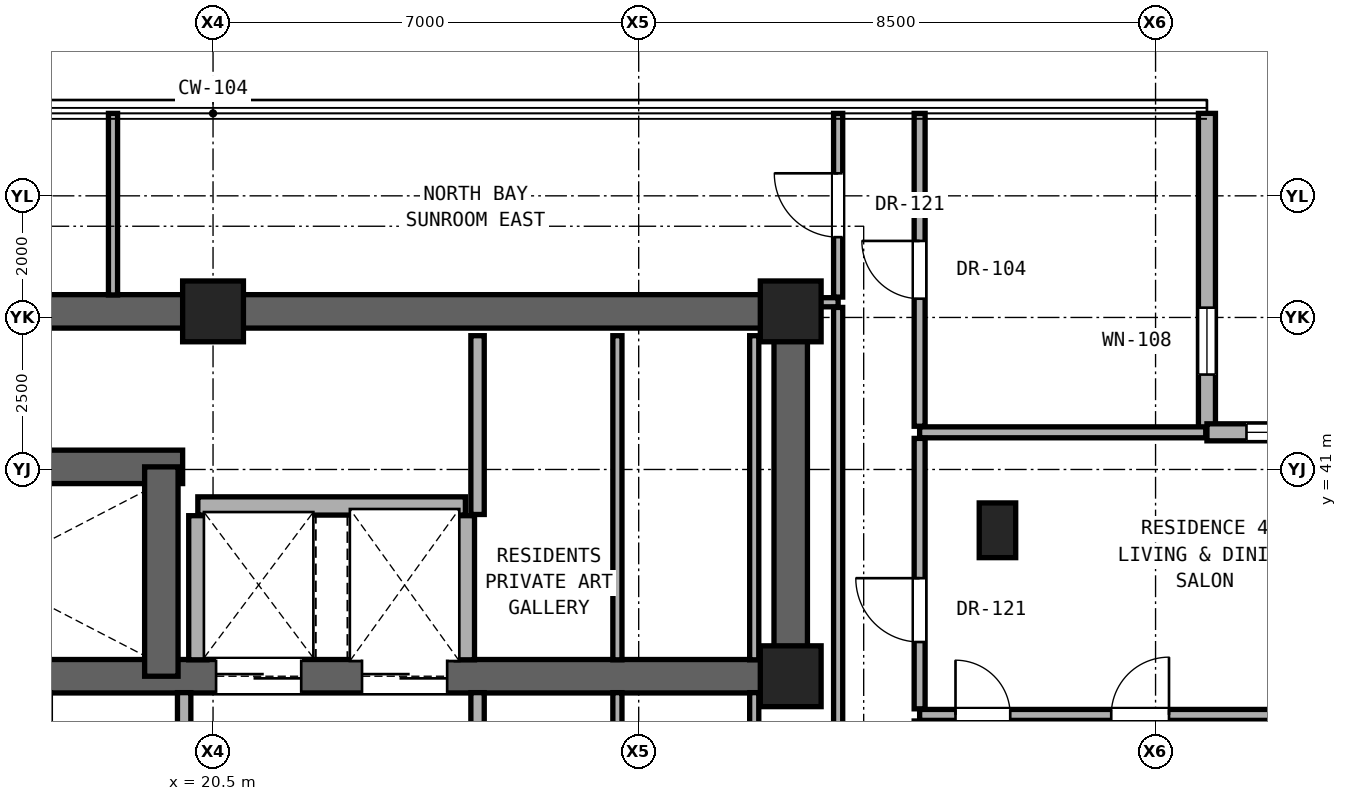
"""IFC4 building model, lengths in metres.
Left out: names, types, materials, properties, quantities, classifications, styles, units other than length and angle.
Written with IfcOpenShell. Run it as: python <this file> out.ifc"""

import sys

from ifc_helpers import new_model, si_unit, direction, frame, frame_2d, origin, origin_2d, place, context, subcontext, project, spatial, rectangle, extrude, element, fill, save


model = new_model("IFC4")
c1 = context("Model", 3, precision=1e-05, world=origin(), true_north=direction((0.0, 1.0)))
c2 = subcontext(c1, "Body", "Model", "MODEL_VIEW")
j1 = project(units=[si_unit("LENGTHUNIT", "METRE"), si_unit("PLANEANGLEUNIT", "RADIAN")], contexts=[c1])
p1 = place(None, origin())
s1 = spatial("IfcSite", under=j1, at=p1, CompositionType="ELEMENT")
p2 = place(p1, origin())
s2 = spatial("IfcBuilding", under=s1, at=p2, CompositionType="ELEMENT")
p3 = place(p2, frame((0.0, 0.0, 177.15)))
s3 = spatial("IfcBuildingStorey", under=s2, at=p3, CompositionType="ELEMENT", Elevation=177.15)
for number, where, z_axis, x_axis in (
    (1, (30.0, 37.6, 0.0), (0.0, 0.0, 1.0), (1.0, 0.0, 0.0)),
    (2, (20.5, 43.6, 0.0), (0.0, 0.0, 1.0), (1.0, 0.0, 0.0)),
    (3, (30.0, 43.6, 0.0), (0.0, 0.0, 1.0), (1.0, 0.0, 0.0)),
):
    element("IfcColumn", number, at=place(p3, frame(where, z_axis=z_axis, x_axis=x_axis)), inside=s3, PredefinedType="COLUMN", context=c2, shape_type="SweptSolid", body=[
        extrude(rectangle(XDim=1.0, YDim=1.0, at=origin_2d()), origin(), (0.0, 0.0, 1.0), 3.25),
    ])
p4 = place(p3, frame((33.4, 40.0, 0.0), z_axis=(0.0, 0.0, 1.0), x_axis=(1.0, 0.0, 0.0)))
e4 = element("IfcColumn", 4, at=p4, inside=s3, PredefinedType="PILASTER", context=c2, shape_type="SweptSolid", body=[
    extrude(rectangle(XDim=0.6, YDim=0.9, at=origin_2d()), origin(), (0.0, 0.0, 1.0), 3.25),
])
p5 = place(p3, frame((11.0, 43.6, 0.0), z_axis=(0.0, 0.0, 1.0), x_axis=(1.0, 0.0, 0.0)))
e5 = element("IfcWall", 5, at=p5, inside=s3, PredefinedType="SHEAR", context=c2, shape_type="SweptSolid", body=[
    extrude(rectangle(XDim=19.0, YDim=0.55, at=frame_2d((9.5, 0.0))), origin(), (0.0, 0.0, 1.0), 3.05),
])
p6 = place(p3, frame((30.0, 37.6, 0.0), z_axis=(0.0, 0.0, 1.0), x_axis=(0.0, 1.0, 0.0)))
e6 = element("IfcWall", 6, at=p6, inside=s3, PredefinedType="SHEAR", context=c2, shape_type="SweptSolid", body=[
    extrude(rectangle(XDim=6.0, YDim=0.55, at=frame_2d((3.0, 0.0))), origin(), (0.0, 0.0, 1.0), 3.05),
])
p7 = place(p3, frame((11.0, 37.6, 0.0), z_axis=(0.0, 0.0, 1.0), x_axis=(1.0, 0.0, 0.0)))
e7 = element("IfcWall", 7, at=p7, inside=s3, PredefinedType="SHEAR", context=c2, shape_type="SweptSolid", body=[
    extrude(rectangle(XDim=19.0, YDim=0.55, at=frame_2d((9.5, 0.0))), origin(), (0.0, 0.0, 1.0), 3.05),
])
p8 = place(p7, frame((1.06, 0.0, 0.0)))
e8 = element("IfcOpeningElement", 8, at=p8, cuts=e7, PredefinedType="OPENING", context=c2, shape_type="SweptSolid", body=[
    extrude(rectangle(XDim=1.15, YDim=2.2, at=frame_2d((0.575, 1.1))), frame((0.0, 0.285, 0.0), z_axis=(0.0, -1.0, 0.0), x_axis=(1.0, 0.0, 0.0)), (0.0, 0.0, 1.0), 0.57),
])
p9 = place(p7, frame((9.55, 0.0, 0.0)))
e9 = element("IfcOpeningElement", 9, at=p9, cuts=e7, PredefinedType="OPENING", context=c2, shape_type="SweptSolid", body=[
    extrude(rectangle(XDim=1.4, YDim=2.35, at=frame_2d((0.7, 1.175))), frame((0.0, 0.285, 0.0), z_axis=(0.0, -1.0, 0.0), x_axis=(1.0, 0.0, 0.0)), (0.0, 0.0, 1.0), 0.57),
])
p10 = place(p7, frame((11.95, 0.0, 0.0)))
e10 = element("IfcOpeningElement", 10, at=p10, cuts=e7, PredefinedType="OPENING", context=c2, shape_type="SweptSolid", body=[
    extrude(rectangle(XDim=1.4, YDim=2.35, at=frame_2d((0.7, 1.175))), frame((0.0, 0.285, 0.0), z_axis=(0.0, -1.0, 0.0), x_axis=(1.0, 0.0, 0.0)), (0.0, 0.0, 1.0), 0.57),
])
p11 = place(p3, frame((11.0, 41.043, 0.0), z_axis=(0.0, 0.0, 1.0), x_axis=(1.0, 0.0, 0.0)))
e11 = element("IfcWall", 11, at=p11, inside=s3, PredefinedType="SHEAR", context=c2, shape_type="SweptSolid", body=[
    extrude(rectangle(XDim=9.0, YDim=0.55, at=frame_2d((4.5, 0.0))), origin(), (0.0, 0.0, 1.0), 3.05),
])
p12 = place(p3, frame((19.65, 37.6, 0.0), z_axis=(0.0, 0.0, 1.0), x_axis=(0.0, 1.0, 0.0)))
e12 = element("IfcWall", 12, at=p12, inside=s3, PredefinedType="SHEAR", context=c2, shape_type="SweptSolid", body=[
    extrude(rectangle(XDim=3.443, YDim=0.55, at=frame_2d((1.721, 0.0))), origin(), (0.0, 0.0, 1.0), 3.05),
])
p13 = place(p3, frame((36.845, 41.611, 0.0), z_axis=(0.0, 0.0, 1.0), x_axis=(0.0, 1.0, 0.0)))
e13 = element("IfcWall", 13, at=p13, inside=s3, PredefinedType="SOLIDWALL", context=c2, shape_type="SweptSolid", body=[
    extrude(rectangle(XDim=5.245, YDim=0.28, at=frame_2d((2.623, 0.0))), origin(), (0.0, 0.0, 1.0), 3.03),
])
p14 = place(p13, frame((0.95, 0.0, 0.85)))
e14 = element("IfcOpeningElement", 14, at=p14, cuts=e13, PredefinedType="OPENING", context=c2, shape_type="SweptSolid", body=[
    extrude(rectangle(XDim=1.1, YDim=2.0, at=frame_2d((0.55, 1.0))), frame((0.0, 0.15, 0.0), z_axis=(0.0, -1.0, 0.0), x_axis=(1.0, 0.0, 0.0)), (0.0, 0.0, 1.0), 0.3),
])
p15 = place(p3, frame((42.09, 41.611, 0.0), z_axis=(0.0, 0.0, 1.0), x_axis=(-1.0, 0.0, 0.0)))
e15 = element("IfcWall", 15, at=p15, inside=s3, PredefinedType="SOLIDWALL", context=c2, shape_type="SweptSolid", body=[
    extrude(rectangle(XDim=5.245, YDim=0.28, at=frame_2d((2.623, 0.0))), origin(), (0.0, 0.0, 1.0), 3.03),
])
p16 = place(p15, frame((3.495, 0.0, 0.85)))
e16 = element("IfcOpeningElement", 16, at=p16, cuts=e15, PredefinedType="OPENING", context=c2, shape_type="SweptSolid", body=[
    extrude(rectangle(XDim=1.1, YDim=2.0, at=frame_2d((0.55, 1.0))), frame((0.0, 0.15, 0.0), z_axis=(0.0, -1.0, 0.0), x_axis=(1.0, 0.0, 0.0)), (0.0, 0.0, 1.0), 0.3),
])
p17 = place(p3, frame((32.12, 36.964, 0.0), z_axis=(0.0, 0.0, 1.0), x_axis=(1.0, 0.0, 0.0)))
e17 = element("IfcWall", 17, at=p17, inside=s3, PredefinedType="PARTITIONING", context=c2, shape_type="SweptSolid", body=[
    extrude(rectangle(XDim=9.97, YDim=0.18, at=frame_2d((4.985, 0.0))), origin(), (0.0, 0.0, 1.0), 2.269),
])
p18 = place(p17, frame((7.396, 0.0, 0.0)))
e18 = element("IfcOpeningElement", 18, at=p18, cuts=e17, PredefinedType="OPENING", context=c2, shape_type="SweptSolid", body=[
    extrude(rectangle(XDim=0.95, YDim=2.15, at=frame_2d((0.475, 1.075))), frame((0.0, 0.1, 0.0), z_axis=(0.0, -1.0, 0.0), x_axis=(1.0, 0.0, 0.0)), (0.0, 0.0, 1.0), 0.2),
])
p19 = place(p17, frame((3.151, 0.0, 0.0)))
e19 = element("IfcOpeningElement", 19, at=p19, cuts=e17, PredefinedType="OPENING", context=c2, shape_type="SweptSolid", body=[
    extrude(rectangle(XDim=0.95, YDim=2.15, at=frame_2d((0.475, 1.075))), frame((0.0, 0.1, 0.0), z_axis=(0.0, -1.0, 0.0), x_axis=(1.0, 0.0, 0.0)), (0.0, 0.0, 1.0), 0.2),
])
p20 = place(p17, frame((0.59, 0.0, 0.0)))
e20 = element("IfcOpeningElement", 20, at=p20, cuts=e17, PredefinedType="OPENING", context=c2, shape_type="SweptSolid", body=[
    extrude(rectangle(XDim=0.9, YDim=2.1, at=frame_2d((0.45, 1.05))), frame((0.0, 0.1, 0.0), z_axis=(0.0, -1.0, 0.0), x_axis=(1.0, 0.0, 0.0)), (0.0, 0.0, 1.0), 0.2),
])
p21 = place(p3, frame((20.25, 40.4, 0.0), z_axis=(0.0, 0.0, 1.0), x_axis=(1.0, 0.0, 0.0)))
e21 = element("IfcWall", 21, at=p21, inside=s3, PredefinedType="SOLIDWALL", context=c2, shape_type="SweptSolid", body=[
    extrude(rectangle(XDim=4.4, YDim=0.3, at=frame_2d((2.2, 0.0))), origin(), (0.0, 0.0, 1.0), 3.05),
])
p22 = place(p3, frame((32.12, 41.611, 0.0), z_axis=(0.0, 0.0, 1.0), x_axis=(1.0, 0.0, 0.0)))
e22 = element("IfcWall", 22, at=p22, inside=s3, PredefinedType="PARTITIONING", context=c2, shape_type="SweptSolid", body=[
    extrude(rectangle(XDim=4.705, YDim=0.18, at=frame_2d((2.353, 0.0))), origin(), (0.0, 0.0, 1.0), 3.05),
])
p23 = place(p3, frame((30.27, 43.75, 0.0), z_axis=(0.0, 0.0, 1.0), x_axis=(1.0, 0.0, 0.0)))
e23 = element("IfcWall", 23, at=p23, inside=s3, PredefinedType="PARTITIONING", context=c2, shape_type="SweptSolid", body=[
    extrude(rectangle(XDim=0.51, YDim=0.15, at=frame_2d((0.255, 0.0))), origin(), (0.0, 0.0, 1.0), 3.05),
])
p24 = place(p3, frame((18.855, 43.87, 0.0), z_axis=(0.0, 0.0, 1.0), x_axis=(0.0, 1.0, 0.0)))
e24 = element("IfcWall", 24, at=p24, inside=s3, PredefinedType="PARTITIONING", context=c2, shape_type="SweptSolid", body=[
    extrude(rectangle(XDim=2.986, YDim=0.15, at=frame_2d((1.493, 0.0))), origin(), (0.0, 0.0, 1.0), 3.05),
])
p25 = place(p3, frame((20.025, 34.57, 0.0), z_axis=(0.0, 0.0, 1.0), x_axis=(0.0, 1.0, 0.0)))
e25 = element("IfcWall", 25, at=p25, inside=s3, PredefinedType="SOLIDWALL", context=c2, shape_type="SweptSolid", body=[
    extrude(rectangle(XDim=2.76, YDim=0.22, at=frame_2d((1.38, 0.0))), origin(), (0.0, 0.0, 1.0), 3.05),
])
for number, where, z_axis, x_axis in (
    (26, (20.25, 37.87, 0.0), (0.0, 0.0, 1.0), (0.0, 1.0, 0.0)),
    (27, (24.65, 37.87, 0.0), (0.0, 0.0, 1.0), (0.0, 1.0, 0.0)),
):
    element("IfcWall", number, at=place(p3, frame(where, z_axis=z_axis, x_axis=x_axis)), inside=s3, PredefinedType="SOLIDWALL", context=c2, shape_type="SweptSolid", body=[
        extrude(rectangle(XDim=2.37, YDim=0.3, at=frame_2d((1.185, 0.0))), origin(), (0.0, 0.0, 1.0), 3.05),
    ])
p26 = place(p3, frame((24.85, 34.57, 0.0), z_axis=(0.0, 0.0, 1.0), x_axis=(0.0, 1.0, 0.0)))
e28 = element("IfcWall", 28, at=p26, inside=s3, PredefinedType="SOLIDWALL", context=c2, shape_type="SweptSolid", body=[
    extrude(rectangle(XDim=2.76, YDim=0.22, at=frame_2d((1.38, 0.0))), origin(), (0.0, 0.0, 1.0), 3.05),
])
p27 = place(p3, frame((24.85, 40.26, 0.0), z_axis=(0.0, 0.0, 1.0), x_axis=(0.0, 1.0, 0.0)))
e29 = element("IfcWall", 29, at=p27, inside=s3, PredefinedType="SOLIDWALL", context=c2, shape_type="SweptSolid", body=[
    extrude(rectangle(XDim=2.94, YDim=0.22, at=frame_2d((1.47, 0.0))), origin(), (0.0, 0.0, 1.0), 3.05),
])
p28 = place(p3, frame((27.15, 34.57, 0.0), z_axis=(0.0, 0.0, 1.0), x_axis=(0.0, 1.0, 0.0)))
e30 = element("IfcWall", 30, at=p28, inside=s3, PredefinedType="PARTITIONING", context=c2, shape_type="SweptSolid", body=[
    extrude(rectangle(XDim=2.76, YDim=0.15, at=frame_2d((1.38, 0.0))), origin(), (0.0, 0.0, 1.0), 3.05),
])
p29 = place(p3, frame((27.15, 37.87, 0.0), z_axis=(0.0, 0.0, 1.0), x_axis=(0.0, 1.0, 0.0)))
e31 = element("IfcWall", 31, at=p29, inside=s3, PredefinedType="PARTITIONING", context=c2, shape_type="SweptSolid", body=[
    extrude(rectangle(XDim=5.33, YDim=0.15, at=frame_2d((2.665, 0.0))), origin(), (0.0, 0.0, 1.0), 3.05),
])
p30 = place(p3, frame((29.4, 34.57, 0.0), z_axis=(0.0, 0.0, 1.0), x_axis=(0.0, 1.0, 0.0)))
e32 = element("IfcWall", 32, at=p30, inside=s3, PredefinedType="PARTITIONING", context=c2, shape_type="SweptSolid", body=[
    extrude(rectangle(XDim=2.76, YDim=0.15, at=frame_2d((1.38, 0.0))), origin(), (0.0, 0.0, 1.0), 3.05),
])
p31 = place(p3, frame((29.4, 37.87, 0.0), z_axis=(0.0, 0.0, 1.0), x_axis=(0.0, 1.0, 0.0)))
e33 = element("IfcWall", 33, at=p31, inside=s3, PredefinedType="PARTITIONING", context=c2, shape_type="SweptSolid", body=[
    extrude(rectangle(XDim=5.33, YDim=0.15, at=frame_2d((2.665, 0.0))), origin(), (0.0, 0.0, 1.0), 3.05),
])
p32 = place(p3, frame((30.78, 34.57, 0.0), z_axis=(0.0, 0.0, 1.0), x_axis=(0.0, 1.0, 0.0)))
e34 = element("IfcWall", 34, at=p32, inside=s3, PredefinedType="PARTITIONING", context=c2, shape_type="SweptSolid", body=[
    extrude(rectangle(XDim=9.095, YDim=0.15, at=frame_2d((4.547, 0.0))), origin(), (0.0, 0.0, 1.0), 2.442),
])
p33 = place(p3, frame((30.78, 43.835, 0.0), z_axis=(0.0, 0.0, 1.0), x_axis=(0.0, 1.0, 0.0)))
e35 = element("IfcWall", 35, at=p33, inside=s3, PredefinedType="PARTITIONING", context=c2, shape_type="SweptSolid", body=[
    extrude(rectangle(XDim=3.021, YDim=0.15, at=frame_2d((1.51, 0.0))), origin(), (0.0, 0.0, 1.0), 3.05),
])
p34 = place(p33, frame((0.986, 0.0, 0.0)))
e36 = element("IfcOpeningElement", 36, at=p34, cuts=e35, PredefinedType="OPENING", context=c2, shape_type="SweptSolid", body=[
    extrude(rectangle(XDim=1.05, YDim=2.2, at=frame_2d((0.525, 1.1))), frame((0.0, 0.085, 0.0), z_axis=(0.0, -1.0, 0.0), x_axis=(1.0, 0.0, 0.0)), (0.0, 0.0, 1.0), 0.17),
])
p35 = place(p3, frame((32.12, 34.344, 0.0), z_axis=(0.0, 0.0, 1.0), x_axis=(0.0, 1.0, 0.0)))
e37 = element("IfcWall", 37, at=p35, inside=s3, PredefinedType="PARTITIONING", context=c2, shape_type="SweptSolid", body=[
    extrude(rectangle(XDim=2.52, YDim=0.18, at=frame_2d((1.26, 0.0))), origin(), (0.0, 0.0, 1.0), 3.05),
])
p36 = place(p3, frame((32.12, 37.064, 0.0), z_axis=(0.0, 0.0, 1.0), x_axis=(0.0, 1.0, 0.0)))
e38 = element("IfcWall", 38, at=p36, inside=s3, PredefinedType="PARTITIONING", context=c2, shape_type="SweptSolid", body=[
    extrude(rectangle(XDim=4.447, YDim=0.18, at=frame_2d((2.224, 0.0))), origin(), (0.0, 0.0, 1.0), 2.442),
])
p37 = place(p36, frame((1.098, 0.0, 0.0)))
e39 = element("IfcOpeningElement", 39, at=p37, cuts=e38, PredefinedType="OPENING", context=c2, shape_type="SweptSolid", body=[
    extrude(rectangle(XDim=1.05, YDim=2.2, at=frame_2d((0.525, 1.1))), frame((0.0, 0.1, 0.0), z_axis=(0.0, -1.0, 0.0), x_axis=(1.0, 0.0, 0.0)), (0.0, 0.0, 1.0), 0.2),
])
p38 = place(p3, frame((32.12, 41.711, 0.0), z_axis=(0.0, 0.0, 1.0), x_axis=(0.0, 1.0, 0.0)))
e40 = element("IfcWall", 40, at=p38, inside=s3, PredefinedType="PARTITIONING", context=c2, shape_type="SweptSolid", body=[
    extrude(rectangle(XDim=5.145, YDim=0.18, at=frame_2d((2.573, 0.0))), origin(), (0.0, 0.0, 1.0), 3.05),
])
p39 = place(p38, frame((2.097, 0.0, 0.0)))
e41 = element("IfcOpeningElement", 41, at=p39, cuts=e40, PredefinedType="OPENING", context=c2, shape_type="SweptSolid", body=[
    extrude(rectangle(XDim=0.95, YDim=2.15, at=frame_2d((0.475, 1.075))), frame((0.0, 0.1, 0.0), z_axis=(0.0, -1.0, 0.0), x_axis=(1.0, 0.0, 0.0)), (0.0, 0.0, 1.0), 0.2),
])
for number, where, z_axis, x_axis in (
    (42, (34.16, 34.344, 0.0), (0.0, 0.0, 1.0), (0.0, 1.0, 0.0)),
    (43, (37.332, 34.344, 0.0), (0.0, 0.0, 1.0), (0.0, 1.0, 0.0)),
):
    element("IfcWall", number, at=place(p3, frame(where, z_axis=z_axis, x_axis=x_axis)), inside=s3, PredefinedType="PARTITIONING", context=c2, shape_type="SweptSolid", body=[
        extrude(rectangle(XDim=2.52, YDim=0.125, at=frame_2d((1.26, 0.0))), origin(), (0.0, 0.0, 1.0), 3.05),
    ])
p40 = place(p14, origin())
e44 = element("IfcWindow", 44, at=p40, inside=s3, PartitioningType="SINGLE_PANEL", PredefinedType="WINDOW", context=c2, shape_type="SweptSolid", body=[
    extrude(rectangle(XDim=1.1, YDim=2.0, at=frame_2d((0.55, 1.0))), frame((0.0, 0.03, 0.0), z_axis=(0.0, -1.0, 0.0), x_axis=(1.0, 0.0, 0.0)), (0.0, 0.0, 1.0), 0.06),
])
fill(e14, e44)
p41 = place(p16, origin())
e45 = element("IfcWindow", 45, at=p41, inside=s3, PartitioningType="SINGLE_PANEL", PredefinedType="WINDOW", context=c2, shape_type="SweptSolid", body=[
    extrude(rectangle(XDim=1.1, YDim=2.0, at=frame_2d((0.55, 1.0))), frame((0.0, 0.03, 0.0), z_axis=(0.0, -1.0, 0.0), x_axis=(1.0, 0.0, 0.0)), (0.0, 0.0, 1.0), 0.06),
])
fill(e16, e45)
p42 = place(p37, origin())
e46 = element("IfcDoor", 46, at=p42, inside=s3, OperationType="SINGLE_SWING_RIGHT", PredefinedType="DOOR", context=c2, shape_type="SweptSolid", body=[
    extrude(rectangle(XDim=1.05, YDim=2.2, at=frame_2d((0.525, 1.1))), frame((0.0, 0.025, 0.0), z_axis=(0.0, -1.0, 0.0), x_axis=(1.0, 0.0, 0.0)), (0.0, 0.0, 1.0), 0.05),
])
fill(e39, e46)
p43 = place(p19, origin())
e47 = element("IfcDoor", 47, at=p43, inside=s3, OperationType="SINGLE_SWING_RIGHT", PredefinedType="DOOR", context=c2, shape_type="SweptSolid", body=[
    extrude(rectangle(XDim=0.95, YDim=2.15, at=frame_2d((0.475, 1.075))), frame((0.0, 0.025, 0.0), z_axis=(0.0, -1.0, 0.0), x_axis=(1.0, 0.0, 0.0)), (0.0, 0.0, 1.0), 0.05),
])
fill(e19, e47)
p44 = place(p20, origin())
e48 = element("IfcDoor", 48, at=p44, inside=s3, OperationType="SINGLE_SWING_LEFT", PredefinedType="DOOR", context=c2, shape_type="SweptSolid", body=[
    extrude(rectangle(XDim=0.9, YDim=2.1, at=frame_2d((0.45, 1.05))), frame((0.0, 0.025, 0.0), z_axis=(0.0, -1.0, 0.0), x_axis=(1.0, 0.0, 0.0)), (0.0, 0.0, 1.0), 0.05),
])
fill(e20, e48)
p45 = place(p34, origin())
e49 = element("IfcDoor", 49, at=p45, inside=s3, OperationType="SINGLE_SWING_RIGHT", PredefinedType="DOOR", context=c2, shape_type="SweptSolid", body=[
    extrude(rectangle(XDim=1.05, YDim=2.2, at=frame_2d((0.525, 1.1))), frame((0.0, 0.025, 0.0), z_axis=(0.0, -1.0, 0.0), x_axis=(1.0, 0.0, 0.0)), (0.0, 0.0, 1.0), 0.05),
])
fill(e36, e49)
p46 = place(p39, origin())
e50 = element("IfcDoor", 50, at=p46, inside=s3, OperationType="SINGLE_SWING_RIGHT", PredefinedType="DOOR", context=c2, shape_type="SweptSolid", body=[
    extrude(rectangle(XDim=0.95, YDim=2.15, at=frame_2d((0.475, 1.075))), frame((0.0, 0.025, 0.0), z_axis=(0.0, -1.0, 0.0), x_axis=(1.0, 0.0, 0.0)), (0.0, 0.0, 1.0), 0.05),
])
fill(e41, e50)
p47 = place(p9, origin())
e51 = element("IfcDoor", 51, at=p47, inside=s3, OperationType="DOUBLE_DOOR_SLIDING", PredefinedType="DOOR", context=c2, shape_type="SweptSolid", body=[
    extrude(rectangle(XDim=1.4, YDim=2.35, at=frame_2d((0.7, 1.175))), frame((0.0, 0.025, 0.0), z_axis=(0.0, -1.0, 0.0), x_axis=(1.0, 0.0, 0.0)), (0.0, 0.0, 1.0), 0.05),
])
fill(e9, e51)
p48 = place(p10, origin())
e52 = element("IfcDoor", 52, at=p48, inside=s3, OperationType="DOUBLE_DOOR_SLIDING", PredefinedType="DOOR", context=c2, shape_type="SweptSolid", body=[
    extrude(rectangle(XDim=1.4, YDim=2.35, at=frame_2d((0.7, 1.175))), frame((0.0, 0.025, 0.0), z_axis=(0.0, -1.0, 0.0), x_axis=(1.0, 0.0, 0.0)), (0.0, 0.0, 1.0), 0.05),
])
fill(e10, e52)
save(model, sys.argv[1])
